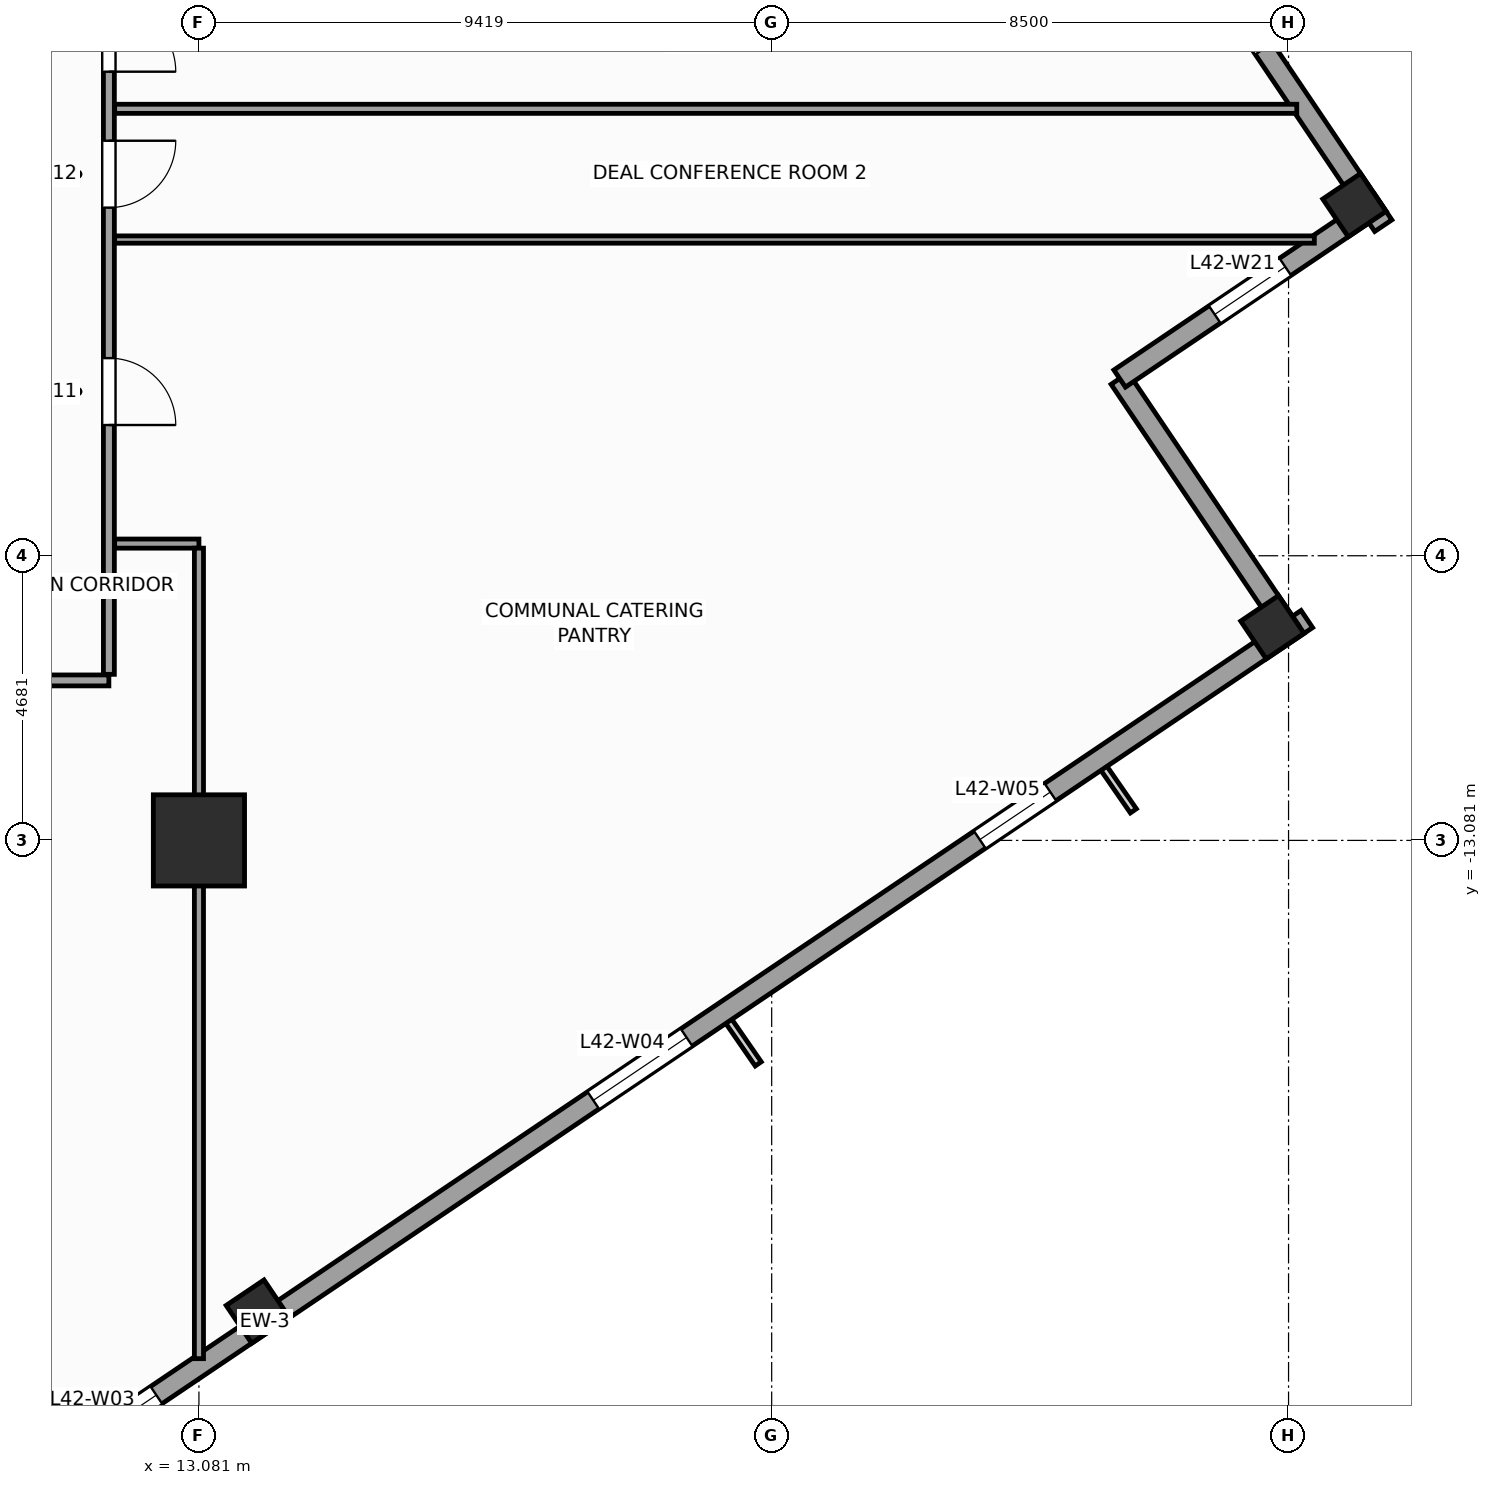
"""IFC4 building model, lengths in metres.
Left out: names, types, materials, properties, quantities, classifications, styles, units other than length and angle.
Written with IfcOpenShell. Run it as: python <this file> out.ifc"""

import sys

from ifc_helpers import new_model, si_unit, direction, frame, frame_2d, origin, origin_2d, place, context, subcontext, project, spatial, rectangle, extrude, source, transform, mapped, element, fill, save


model = new_model("IFC4")
c1 = context("Model", 3, precision=1e-05, world=origin(), true_north=direction((0.0, 1.0)))
c2 = subcontext(c1, "Body", "Model", "MODEL_VIEW")
j1 = project(units=[si_unit("LENGTHUNIT", "METRE"), si_unit("PLANEANGLEUNIT", "RADIAN")], contexts=[c1])
p1 = place(None, origin())
s1 = spatial("IfcSite", under=j1, at=p1, CompositionType="ELEMENT")
p2 = place(p1, origin())
s2 = spatial("IfcBuilding", under=s1, at=p2, CompositionType="ELEMENT")
p3 = place(p2, frame((0.0, 0.0, 176.4)))
s3 = spatial("IfcBuildingStorey", under=s2, at=p3, CompositionType="ELEMENT", Elevation=176.4)
m1 = source(origin(), c2, "Body", "SweptSolid", [
    extrude(rectangle(XDim=1.5, YDim=1.5, at=origin_2d()), origin(), (0.0, 0.0, 1.0), 4.0),
])
p4 = place(p3, frame((13.081, -13.081, 0.0), z_axis=(0.0, 0.0, 1.0), x_axis=(1.0, 0.0, 0.0)))
e1 = element("IfcColumn", 1, at=p4, inside=s3, PredefinedType="COLUMN", context=c2, shape_type="MappedRepresentation", body=[
    mapped(m1, transform((0.0, 0.0, 0.0), scale=1.0)),
])
m2 = source(origin(), c2, "Body", "SweptSolid", [
    extrude(rectangle(XDim=0.75, YDim=0.75, at=origin_2d()), origin(), (0.0, 0.0, 1.0), 4.0),
])
for number, where, z_axis, x_axis in (
    (2, (14.05, -20.83, 0.0), (0.0, 0.0, 1.0), (0.829, 0.559, 0.0)),
    (3, (30.734, -9.576, 0.0), (0.0, 0.0, 1.0), (0.829, 0.559, 0.0)),
    (4, (32.083, -2.635, 0.0), (0.0, 0.0, 1.0), (0.829, 0.559, 0.0)),
):
    element("IfcColumn", number, at=place(p3, frame(where, z_axis=z_axis, x_axis=x_axis)), inside=s3, PredefinedType="COLUMN", context=c2, shape_type="MappedRepresentation", body=[
        mapped(m2, transform((0.0, 0.0, 0.0), scale=1.0)),
    ])
p5 = place(p3, frame((-2.972, -32.558, 0.0), z_axis=(0.0, 0.0, 1.0), x_axis=(0.829036218961, 0.559194910251, 0.0)))
e5 = element("IfcWall", 5, at=p5, inside=s3, PredefinedType="STANDARD", context=c2, shape_type="SweptSolid", body=[
    extrude(rectangle(XDim=41.34, YDim=0.34, at=frame_2d((20.67, 0.0))), origin(), (0.0, 0.0, 1.0), 3.04),
])
p6 = place(p5, frame((14.545, 0.0, 0.0)))
e6 = element("IfcOpeningElement", 6, at=p6, cuts=e5, PredefinedType="OPENING", context=c2, shape_type="SweptSolid", body=[
    extrude(rectangle(XDim=1.05, YDim=2.25, at=frame_2d((0.525, 1.125))), frame((0.0, 0.18, 0.0), z_axis=(0.0, -1.0, 0.0), x_axis=(1.0, 0.0, 0.0)), (0.0, 0.0, 1.0), 0.36),
])
p7 = place(p5, frame((4.261, 0.0, 0.56)))
e7 = element("IfcOpeningElement", 7, at=p7, cuts=e5, PredefinedType="OPENING", context=c2, shape_type="SweptSolid", body=[
    extrude(rectangle(XDim=1.4, YDim=2.4, at=frame_2d((0.7, 1.2))), frame((0.0, 0.18, 0.0), z_axis=(0.0, -1.0, 0.0), x_axis=(1.0, 0.0, 0.0)), (0.0, 0.0, 1.0), 0.36),
])
p8 = place(p5, frame((11.064, 0.0, 0.61)))
e8 = element("IfcOpeningElement", 8, at=p8, cuts=e5, PredefinedType="OPENING", context=c2, shape_type="SweptSolid", body=[
    extrude(rectangle(XDim=1.85, YDim=2.35, at=frame_2d((0.925, 1.175))), frame((0.0, 0.18, 0.0), z_axis=(0.0, -1.0, 0.0), x_axis=(1.0, 0.0, 0.0)), (0.0, 0.0, 1.0), 0.36),
])
p9 = place(p5, frame((16.668, 0.0, 0.61)))
e9 = element("IfcOpeningElement", 9, at=p9, cuts=e5, PredefinedType="OPENING", context=c2, shape_type="SweptSolid", body=[
    extrude(rectangle(XDim=1.85, YDim=2.35, at=frame_2d((0.925, 1.175))), frame((0.0, 0.18, 0.0), z_axis=(0.0, -1.0, 0.0), x_axis=(1.0, 0.0, 0.0)), (0.0, 0.0, 1.0), 0.36),
])
p10 = place(p5, frame((27.186, 0.0, 0.61)))
e10 = element("IfcOpeningElement", 10, at=p10, cuts=e5, PredefinedType="OPENING", context=c2, shape_type="SweptSolid", body=[
    extrude(rectangle(XDim=1.85, YDim=2.35, at=frame_2d((0.925, 1.175))), frame((0.0, 0.18, 0.0), z_axis=(0.0, -1.0, 0.0), x_axis=(1.0, 0.0, 0.0)), (0.0, 0.0, 1.0), 0.36),
])
p11 = place(p5, frame((34.852, 0.0, 0.56)))
e11 = element("IfcOpeningElement", 11, at=p11, cuts=e5, PredefinedType="OPENING", context=c2, shape_type="SweptSolid", body=[
    extrude(rectangle(XDim=1.4, YDim=2.4, at=frame_2d((0.7, 1.2))), frame((0.0, 0.18, 0.0), z_axis=(0.0, -1.0, 0.0), x_axis=(1.0, 0.0, 0.0)), (0.0, 0.0, 1.0), 0.36),
])
p12 = place(p3, frame((31.019, -9.631, 0.0), z_axis=(0.0, 0.0, 1.0), x_axis=(-0.559210350234, 0.829025804298, 0.0)))
e12 = element("IfcWall", 12, at=p12, inside=s3, PredefinedType="STANDARD", context=c2, shape_type="SweptSolid", body=[
    extrude(rectangle(XDim=5.0, YDim=0.34, at=frame_2d((2.5, 0.0))), origin(), (0.0, 0.0, 1.0), 3.74),
])
p13 = place(p3, frame((28.223, -5.486, 0.0), z_axis=(0.0, 0.0, 1.0), x_axis=(0.82905227345, 0.559171107879, 0.0)))
e13 = element("IfcWall", 13, at=p13, inside=s3, PredefinedType="STANDARD", context=c2, shape_type="SweptSolid", body=[
    extrude(rectangle(XDim=5.17, YDim=0.34, at=frame_2d((2.585, 0.0))), origin(), (0.0, 0.0, 1.0), 3.04),
])
p14 = place(p13, frame((1.885, 0.0, 0.56)))
e14 = element("IfcOpeningElement", 14, at=p14, cuts=e13, PredefinedType="OPENING", context=c2, shape_type="SweptSolid", body=[
    extrude(rectangle(XDim=1.4, YDim=2.4, at=frame_2d((0.7, 1.2))), frame((0.0, 0.18, 0.0), z_axis=(0.0, -1.0, 0.0), x_axis=(1.0, 0.0, 0.0)), (0.0, 0.0, 1.0), 0.36),
])
p15 = place(p3, frame((32.558, -2.972, 0.0), z_axis=(0.0, 0.0, 1.0), x_axis=(-0.559194910251, 0.829036218961, 0.0)))
e15 = element("IfcWall", 15, at=p15, inside=s3, PredefinedType="STANDARD", context=c2, shape_type="SweptSolid", body=[
    extrude(rectangle(XDim=41.34, YDim=0.34, at=frame_2d((20.67, 0.0))), origin(), (0.0, 0.0, 1.0), 3.04),
])
p16 = place(p15, frame((3.511, 0.0, 0.56)))
e16 = element("IfcOpeningElement", 16, at=p16, cuts=e15, PredefinedType="OPENING", context=c2, shape_type="SweptSolid", body=[
    extrude(rectangle(XDim=1.4, YDim=2.4, at=frame_2d((0.7, 1.2))), frame((0.0, 0.18, 0.0), z_axis=(0.0, -1.0, 0.0), x_axis=(1.0, 0.0, 0.0)), (0.0, 0.0, 1.0), 0.36),
])
p17 = place(p15, frame((11.064, 0.0, 0.61)))
e17 = element("IfcOpeningElement", 17, at=p17, cuts=e15, PredefinedType="OPENING", context=c2, shape_type="SweptSolid", body=[
    extrude(rectangle(XDim=1.85, YDim=2.35, at=frame_2d((0.925, 1.175))), frame((0.0, 0.18, 0.0), z_axis=(0.0, -1.0, 0.0), x_axis=(1.0, 0.0, 0.0)), (0.0, 0.0, 1.0), 0.36),
])
p18 = place(p15, frame((18.168, 0.0, 0.61)))
e18 = element("IfcOpeningElement", 18, at=p18, cuts=e15, PredefinedType="OPENING", context=c2, shape_type="SweptSolid", body=[
    extrude(rectangle(XDim=1.85, YDim=2.35, at=frame_2d((0.925, 1.175))), frame((0.0, 0.18, 0.0), z_axis=(0.0, -1.0, 0.0), x_axis=(1.0, 0.0, 0.0)), (0.0, 0.0, 1.0), 0.36),
])
p19 = place(p15, frame((27.186, 0.0, 0.61)))
e19 = element("IfcOpeningElement", 19, at=p19, cuts=e15, PredefinedType="OPENING", context=c2, shape_type="SweptSolid", body=[
    extrude(rectangle(XDim=1.85, YDim=2.35, at=frame_2d((0.925, 1.175))), frame((0.0, 0.18, 0.0), z_axis=(0.0, -1.0, 0.0), x_axis=(1.0, 0.0, 0.0)), (0.0, 0.0, 1.0), 0.36),
])
p20 = place(p15, frame((34.852, 0.0, 0.56)))
e20 = element("IfcOpeningElement", 20, at=p20, cuts=e15, PredefinedType="OPENING", context=c2, shape_type="SweptSolid", body=[
    extrude(rectangle(XDim=1.4, YDim=2.4, at=frame_2d((0.7, 1.2))), frame((0.0, 0.18, 0.0), z_axis=(0.0, -1.0, 0.0), x_axis=(1.0, 0.0, 0.0)), (0.0, 0.0, 1.0), 0.36),
])
p21 = place(p3, frame((-10.45, -10.45, 0.0), z_axis=(0.0, 0.0, 1.0), x_axis=(1.0, 0.0, 0.0)))
e21 = element("IfcWall", 21, at=p21, inside=s3, PredefinedType="PARTITIONING", context=c2, shape_type="SweptSolid", body=[
    extrude(rectangle(XDim=22.05, YDim=0.18, at=frame_2d((11.025, 0.0))), origin(), (0.0, 0.0, 1.0), 3.74),
])
p22 = place(p21, frame((15.086, 0.0, 0.0)))
e22 = element("IfcOpeningElement", 22, at=p22, cuts=e21, PredefinedType="OPENING", context=c2, shape_type="SweptSolid", body=[
    extrude(rectangle(XDim=0.95, YDim=2.1, at=frame_2d((0.475, 1.05))), frame((0.0, 0.1, 0.0), z_axis=(0.0, -1.0, 0.0), x_axis=(1.0, 0.0, 0.0)), (0.0, 0.0, 1.0), 0.2),
])
p23 = place(p21, frame((7.611, 0.0, 0.0)))
e23 = element("IfcOpeningElement", 23, at=p23, cuts=e21, PredefinedType="OPENING", context=c2, shape_type="SweptSolid", body=[
    extrude(rectangle(XDim=0.95, YDim=2.1, at=frame_2d((0.475, 1.05))), frame((0.0, 0.1, 0.0), z_axis=(0.0, -1.0, 0.0), x_axis=(1.0, 0.0, 0.0)), (0.0, 0.0, 1.0), 0.2),
])
p24 = place(p21, frame((2.939, 0.0, 0.0)))
e24 = element("IfcOpeningElement", 24, at=p24, cuts=e21, PredefinedType="OPENING", context=c2, shape_type="SweptSolid", body=[
    extrude(rectangle(XDim=1.1, YDim=2.2, at=frame_2d((0.55, 1.1))), frame((0.0, 0.1, 0.0), z_axis=(0.0, -1.0, 0.0), x_axis=(1.0, 0.0, 0.0)), (0.0, 0.0, 1.0), 0.2),
])
p25 = place(p21, frame((11.175, 0.0, 0.0)))
e25 = element("IfcOpeningElement", 25, at=p25, cuts=e21, PredefinedType="OPENING", context=c2, shape_type="SweptSolid", body=[
    extrude(rectangle(XDim=1.1, YDim=2.2, at=frame_2d((0.55, 1.1))), frame((0.0, 0.1, 0.0), z_axis=(0.0, -1.0, 0.0), x_axis=(1.0, 0.0, 0.0)), (0.0, 0.0, 1.0), 0.2),
])
p26 = place(p21, frame((18.805, 0.0, 0.0)))
e26 = element("IfcOpeningElement", 26, at=p26, cuts=e21, PredefinedType="OPENING", context=c2, shape_type="SweptSolid", body=[
    extrude(rectangle(XDim=1.1, YDim=2.2, at=frame_2d((0.55, 1.1))), frame((0.0, 0.1, 0.0), z_axis=(0.0, -1.0, 0.0), x_axis=(1.0, 0.0, 0.0)), (0.0, 0.0, 1.0), 0.2),
])
p27 = place(p3, frame((11.6, -10.35, 0.0), z_axis=(0.0, 0.0, 1.0), x_axis=(0.0, 1.0, 0.0)))
e27 = element("IfcWall", 27, at=p27, inside=s3, PredefinedType="PARTITIONING", context=c2, shape_type="SweptSolid", body=[
    extrude(rectangle(XDim=11.95, YDim=0.18, at=frame_2d((5.975, 0.0))), origin(), (0.0, 0.0, 1.0), 3.74),
])
p28 = place(p27, frame((9.911, 0.0, 0.0)))
e28 = element("IfcOpeningElement", 28, at=p28, cuts=e27, PredefinedType="OPENING", context=c2, shape_type="SweptSolid", body=[
    extrude(rectangle(XDim=1.1, YDim=2.2, at=frame_2d((0.55, 1.1))), frame((0.0, 0.1, 0.0), z_axis=(0.0, -1.0, 0.0), x_axis=(1.0, 0.0, 0.0)), (0.0, 0.0, 1.0), 0.2),
])
p29 = place(p27, frame((4.1, 0.0, 0.0)))
e29 = element("IfcOpeningElement", 29, at=p29, cuts=e27, PredefinedType="OPENING", context=c2, shape_type="SweptSolid", body=[
    extrude(rectangle(XDim=1.1, YDim=2.2, at=frame_2d((0.55, 1.1))), frame((0.0, 0.1, 0.0), z_axis=(0.0, -1.0, 0.0), x_axis=(1.0, 0.0, 0.0)), (0.0, 0.0, 1.0), 0.2),
])
p30 = place(p27, frame((7.675, 0.0, 0.0)))
e30 = element("IfcOpeningElement", 30, at=p30, cuts=e27, PredefinedType="OPENING", context=c2, shape_type="SweptSolid", body=[
    extrude(rectangle(XDim=1.1, YDim=2.2, at=frame_2d((0.55, 1.1))), frame((0.0, 0.1, 0.0), z_axis=(0.0, -1.0, 0.0), x_axis=(1.0, 0.0, 0.0)), (0.0, 0.0, 1.0), 0.2),
])
p31 = place(p3, frame((11.695, -1.05, 0.0), z_axis=(0.0, 0.0, 1.0), x_axis=(1.0, 0.0, 0.0)))
e31 = element("IfcWall", 31, at=p31, inside=s3, PredefinedType="PARTITIONING", context=c2, shape_type="SweptSolid", body=[
    extrude(rectangle(XDim=19.44, YDim=0.15, at=frame_2d((9.72, 0.0))), origin(), (0.0, 0.0, 1.0), 3.74),
])
p32 = place(p3, frame((11.695, -8.2, 0.0), z_axis=(0.0, 0.0, 1.0), x_axis=(1.0, 0.0, 0.0)))
e32 = element("IfcWall", 32, at=p32, inside=s3, PredefinedType="PARTITIONING", context=c2, shape_type="SweptSolid", body=[
    extrude(rectangle(XDim=1.386, YDim=0.15, at=frame_2d((0.693, 0.0))), origin(), (0.0, 0.0, 1.0), 3.74),
])
p33 = place(p3, frame((13.081, -8.275, 0.0), z_axis=(0.0, 0.0, 1.0), x_axis=(0.0, -1.0, 0.0)))
e33 = element("IfcWall", 33, at=p33, inside=s3, PredefinedType="PARTITIONING", context=c2, shape_type="SweptSolid", body=[
    extrude(rectangle(XDim=13.329, YDim=0.15, at=frame_2d((6.664, 0.0))), origin(), (0.0, 0.0, 1.0), 2.84),
])
p34 = place(p3, frame((11.695, -3.2, 0.0), z_axis=(0.0, 0.0, 1.0), x_axis=(1.0, 0.0, 0.0)))
e34 = element("IfcWall", 34, at=p34, inside=s3, PredefinedType="PARTITIONING", context=c2, shape_type="SweptSolid", body=[
    extrude(rectangle(XDim=19.729, YDim=0.12, at=frame_2d((9.865, 0.0))), origin(), (0.0, 0.0, 1.0), 3.74),
])
m3 = source(origin(), c2, "Body", "SweptSolid", [
    extrude(rectangle(XDim=1.85, YDim=2.35, at=frame_2d((0.925, 1.175))), frame((0.0, 0.03, 0.0), z_axis=(0.0, -1.0, 0.0), x_axis=(1.0, 0.0, 0.0)), (0.0, 0.0, 1.0), 0.06),
])
p35 = place(p9, origin())
e35 = element("IfcWindow", 35, at=p35, inside=s3, PartitioningType="SINGLE_PANEL", PredefinedType="WINDOW", context=c2, shape_type="MappedRepresentation", body=[
    mapped(m3, transform((0.0, 0.0, 0.0), scale=1.0)),
])
fill(e9, e35)
p36 = place(p10, origin())
e36 = element("IfcWindow", 36, at=p36, inside=s3, PartitioningType="SINGLE_PANEL", PredefinedType="WINDOW", context=c2, shape_type="MappedRepresentation", body=[
    mapped(m3, transform((0.0, 0.0, 0.0), scale=1.0)),
])
fill(e10, e36)
m4 = source(origin(), c2, "Body", "SweptSolid", [
    extrude(rectangle(XDim=1.4, YDim=2.4, at=frame_2d((0.7, 1.2))), frame((0.0, 0.03, 0.0), z_axis=(0.0, -1.0, 0.0), x_axis=(1.0, 0.0, 0.0)), (0.0, 0.0, 1.0), 0.06),
])
p37 = place(p11, origin())
e37 = element("IfcWindow", 37, at=p37, inside=s3, PartitioningType="SINGLE_PANEL", PredefinedType="WINDOW", context=c2, shape_type="MappedRepresentation", body=[
    mapped(m4, transform((0.0, 0.0, 0.0), scale=1.0)),
])
fill(e11, e37)
p38 = place(p14, origin())
e38 = element("IfcWindow", 38, at=p38, inside=s3, PartitioningType="SINGLE_PANEL", PredefinedType="WINDOW", context=c2, shape_type="MappedRepresentation", body=[
    mapped(m4, transform((0.0, 0.0, 0.0), scale=1.0)),
])
fill(e14, e38)
m5 = source(origin(), c2, "Body", "SweptSolid", [
    extrude(rectangle(XDim=1.1, YDim=2.2, at=frame_2d((0.55, 1.1))), frame((0.0, 0.025, 0.0), z_axis=(0.0, -1.0, 0.0), x_axis=(1.0, 0.0, 0.0)), (0.0, 0.0, 1.0), 0.05),
])
p39 = place(p28, frame((1.1, 0.0, 0.0), z_axis=(0.0, 0.0, 1.0), x_axis=(-1.0, 0.0, 0.0)))
e39 = element("IfcDoor", 39, at=p39, inside=s3, OperationType="SINGLE_SWING_LEFT", PredefinedType="DOOR", context=c2, shape_type="MappedRepresentation", body=[
    mapped(m5, transform((0.0, 0.0, 0.0), scale=1.0)),
])
fill(e28, e39)
p40 = place(p29, frame((1.1, 0.0, 0.0), z_axis=(0.0, 0.0, 1.0), x_axis=(-1.0, 0.0, 0.0)))
e40 = element("IfcDoor", 40, at=p40, inside=s3, OperationType="SINGLE_SWING_LEFT", PredefinedType="DOOR", context=c2, shape_type="MappedRepresentation", body=[
    mapped(m5, transform((0.0, 0.0, 0.0), scale=1.0)),
])
fill(e29, e40)
p41 = place(p30, frame((1.1, 0.0, 0.0), z_axis=(0.0, 0.0, 1.0), x_axis=(-1.0, 0.0, 0.0)))
e41 = element("IfcDoor", 41, at=p41, inside=s3, OperationType="SINGLE_SWING_RIGHT", PredefinedType="DOOR", context=c2, shape_type="MappedRepresentation", body=[
    mapped(m5, transform((0.0, 0.0, 0.0), scale=1.0)),
])
fill(e30, e41)
save(model, sys.argv[1])
